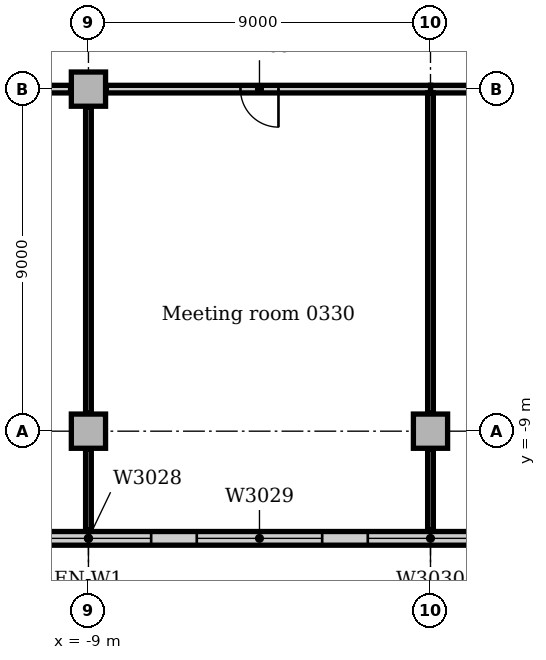
"""IFC4 building model, lengths in metres.
Left out: names, types, materials, properties, quantities, classifications, styles, units other than length and angle.
Written with IfcOpenShell. Run it as: python <this file> out.ifc"""

import sys

from ifc_helpers import new_model, si_unit, direction, frame, frame_2d, origin, origin_with_axes, origin_2d, place, context, subcontext, project, spatial, rectangle, extrude, element, fill, save


model = new_model("IFC4")
c1 = context("Model", 3, precision=1e-05, world=origin(), true_north=direction((0.0, 1.0)))
c2 = subcontext(c1, "Body", "Model", "MODEL_VIEW")
j1 = project(units=[si_unit("LENGTHUNIT", "METRE"), si_unit("PLANEANGLEUNIT", "RADIAN")], contexts=[c1])
p1 = place(None, origin())
s1 = spatial("IfcSite", under=j1, at=p1, CompositionType="ELEMENT")
p2 = place(p1, origin())
s2 = spatial("IfcBuilding", under=s1, at=p2, CompositionType="ELEMENT")
p3 = place(p2, frame((0.0, 0.0, 16.0)))
s3 = spatial("IfcBuildingStorey", under=s2, at=p3, CompositionType="ELEMENT", Elevation=16.0)
for number, where, z_axis, x_axis in (
    (1, (-9.0, -9.0, 0.0), (0.0, 0.0, 1.0), (1.0, 0.0, 0.0)),
    (2, (-9.0, 0.0, 0.0), (0.0, 0.0, 1.0), (1.0, 0.0, 0.0)),
    (3, (0.0, -9.0, 0.0), (0.0, 0.0, 1.0), (1.0, 0.0, 0.0)),
):
    element("IfcColumn", number, at=place(p3, frame(where, z_axis=z_axis, x_axis=x_axis)), inside=s3, PredefinedType="COLUMN", context=c2, shape_type="SweptSolid", body=[
        extrude(rectangle(XDim=0.9, YDim=0.9, at=origin_2d()), origin(), (0.0, 0.0, 1.0), 4.7),
    ])
p4 = place(p3, frame((-81.0, -11.82, 0.0), z_axis=(0.0, 0.0, 1.0), x_axis=(1.0, 0.0, 0.0)))
e4 = element("IfcWall", 4, at=p4, inside=s3, PredefinedType="STANDARD", context=c2, shape_type="SweptSolid", body=[
    extrude(rectangle(XDim=144.0, YDim=0.36, at=frame_2d((72.0, 0.0))), origin(), (0.0, 0.0, 1.0), 4.7),
])
p5 = place(p4, frame((2.85, 0.0, 0.9)))
e5 = element("IfcOpeningElement", 5, at=p5, cuts=e4, PredefinedType="OPENING", context=c2, shape_type="SweptSolid", body=[
    extrude(rectangle(XDim=3.3, YDim=2.4, at=frame_2d((1.65, 1.2))), frame((0.0, 0.19, 0.0), z_axis=(0.0, -1.0, 0.0), x_axis=(1.0, 0.0, 0.0)), (0.0, 0.0, 1.0), 0.38),
])
p6 = place(p4, frame((7.35, 0.0, 0.9)))
e6 = element("IfcOpeningElement", 6, at=p6, cuts=e4, PredefinedType="OPENING", context=c2, shape_type="SweptSolid", body=[
    extrude(rectangle(XDim=3.3, YDim=2.4, at=frame_2d((1.65, 1.2))), frame((0.0, 0.19, 0.0), z_axis=(0.0, -1.0, 0.0), x_axis=(1.0, 0.0, 0.0)), (0.0, 0.0, 1.0), 0.38),
])
p7 = place(p4, frame((11.85, 0.0, 0.9)))
e7 = element("IfcOpeningElement", 7, at=p7, cuts=e4, PredefinedType="OPENING", context=c2, shape_type="SweptSolid", body=[
    extrude(rectangle(XDim=3.3, YDim=2.4, at=frame_2d((1.65, 1.2))), frame((0.0, 0.19, 0.0), z_axis=(0.0, -1.0, 0.0), x_axis=(1.0, 0.0, 0.0)), (0.0, 0.0, 1.0), 0.38),
])
p8 = place(p4, frame((16.35, 0.0, 0.9)))
e8 = element("IfcOpeningElement", 8, at=p8, cuts=e4, PredefinedType="OPENING", context=c2, shape_type="SweptSolid", body=[
    extrude(rectangle(XDim=3.3, YDim=2.4, at=frame_2d((1.65, 1.2))), frame((0.0, 0.19, 0.0), z_axis=(0.0, -1.0, 0.0), x_axis=(1.0, 0.0, 0.0)), (0.0, 0.0, 1.0), 0.38),
])
p9 = place(p4, frame((20.85, 0.0, 0.9)))
e9 = element("IfcOpeningElement", 9, at=p9, cuts=e4, PredefinedType="OPENING", context=c2, shape_type="SweptSolid", body=[
    extrude(rectangle(XDim=3.3, YDim=2.4, at=frame_2d((1.65, 1.2))), frame((0.0, 0.19, 0.0), z_axis=(0.0, -1.0, 0.0), x_axis=(1.0, 0.0, 0.0)), (0.0, 0.0, 1.0), 0.38),
])
p10 = place(p4, frame((25.35, 0.0, 0.9)))
e10 = element("IfcOpeningElement", 10, at=p10, cuts=e4, PredefinedType="OPENING", context=c2, shape_type="SweptSolid", body=[
    extrude(rectangle(XDim=3.3, YDim=2.4, at=frame_2d((1.65, 1.2))), frame((0.0, 0.19, 0.0), z_axis=(0.0, -1.0, 0.0), x_axis=(1.0, 0.0, 0.0)), (0.0, 0.0, 1.0), 0.38),
])
p11 = place(p4, frame((29.85, 0.0, 0.9)))
e11 = element("IfcOpeningElement", 11, at=p11, cuts=e4, PredefinedType="OPENING", context=c2, shape_type="SweptSolid", body=[
    extrude(rectangle(XDim=3.3, YDim=2.4, at=frame_2d((1.65, 1.2))), frame((0.0, 0.19, 0.0), z_axis=(0.0, -1.0, 0.0), x_axis=(1.0, 0.0, 0.0)), (0.0, 0.0, 1.0), 0.38),
])
p12 = place(p4, frame((34.35, 0.0, 0.9)))
e12 = element("IfcOpeningElement", 12, at=p12, cuts=e4, PredefinedType="OPENING", context=c2, shape_type="SweptSolid", body=[
    extrude(rectangle(XDim=3.3, YDim=2.4, at=frame_2d((1.65, 1.2))), frame((0.0, 0.19, 0.0), z_axis=(0.0, -1.0, 0.0), x_axis=(1.0, 0.0, 0.0)), (0.0, 0.0, 1.0), 0.38),
])
p13 = place(p4, frame((38.85, 0.0, 0.9)))
e13 = element("IfcOpeningElement", 13, at=p13, cuts=e4, PredefinedType="OPENING", context=c2, shape_type="SweptSolid", body=[
    extrude(rectangle(XDim=3.3, YDim=2.4, at=frame_2d((1.65, 1.2))), frame((0.0, 0.19, 0.0), z_axis=(0.0, -1.0, 0.0), x_axis=(1.0, 0.0, 0.0)), (0.0, 0.0, 1.0), 0.38),
])
p14 = place(p4, frame((43.35, 0.0, 0.9)))
e14 = element("IfcOpeningElement", 14, at=p14, cuts=e4, PredefinedType="OPENING", context=c2, shape_type="SweptSolid", body=[
    extrude(rectangle(XDim=3.3, YDim=2.4, at=frame_2d((1.65, 1.2))), frame((0.0, 0.19, 0.0), z_axis=(0.0, -1.0, 0.0), x_axis=(1.0, 0.0, 0.0)), (0.0, 0.0, 1.0), 0.38),
])
p15 = place(p4, frame((47.85, 0.0, 0.9)))
e15 = element("IfcOpeningElement", 15, at=p15, cuts=e4, PredefinedType="OPENING", context=c2, shape_type="SweptSolid", body=[
    extrude(rectangle(XDim=3.3, YDim=2.4, at=frame_2d((1.65, 1.2))), frame((0.0, 0.19, 0.0), z_axis=(0.0, -1.0, 0.0), x_axis=(1.0, 0.0, 0.0)), (0.0, 0.0, 1.0), 0.38),
])
p16 = place(p4, frame((52.35, 0.0, 0.9)))
e16 = element("IfcOpeningElement", 16, at=p16, cuts=e4, PredefinedType="OPENING", context=c2, shape_type="SweptSolid", body=[
    extrude(rectangle(XDim=3.3, YDim=2.4, at=frame_2d((1.65, 1.2))), frame((0.0, 0.19, 0.0), z_axis=(0.0, -1.0, 0.0), x_axis=(1.0, 0.0, 0.0)), (0.0, 0.0, 1.0), 0.38),
])
p17 = place(p4, frame((56.85, 0.0, 0.9)))
e17 = element("IfcOpeningElement", 17, at=p17, cuts=e4, PredefinedType="OPENING", context=c2, shape_type="SweptSolid", body=[
    extrude(rectangle(XDim=3.3, YDim=2.4, at=frame_2d((1.65, 1.2))), frame((0.0, 0.19, 0.0), z_axis=(0.0, -1.0, 0.0), x_axis=(1.0, 0.0, 0.0)), (0.0, 0.0, 1.0), 0.38),
])
p18 = place(p4, frame((61.35, 0.0, 0.9)))
e18 = element("IfcOpeningElement", 18, at=p18, cuts=e4, PredefinedType="OPENING", context=c2, shape_type="SweptSolid", body=[
    extrude(rectangle(XDim=3.3, YDim=2.4, at=frame_2d((1.65, 1.2))), frame((0.0, 0.19, 0.0), z_axis=(0.0, -1.0, 0.0), x_axis=(1.0, 0.0, 0.0)), (0.0, 0.0, 1.0), 0.38),
])
p19 = place(p4, frame((65.85, 0.0, 0.9)))
e19 = element("IfcOpeningElement", 19, at=p19, cuts=e4, PredefinedType="OPENING", context=c2, shape_type="SweptSolid", body=[
    extrude(rectangle(XDim=3.3, YDim=2.4, at=frame_2d((1.65, 1.2))), frame((0.0, 0.19, 0.0), z_axis=(0.0, -1.0, 0.0), x_axis=(1.0, 0.0, 0.0)), (0.0, 0.0, 1.0), 0.38),
])
p20 = place(p4, frame((70.35, 0.0, 0.9)))
e20 = element("IfcOpeningElement", 20, at=p20, cuts=e4, PredefinedType="OPENING", context=c2, shape_type="SweptSolid", body=[
    extrude(rectangle(XDim=3.3, YDim=2.4, at=frame_2d((1.65, 1.2))), frame((0.0, 0.19, 0.0), z_axis=(0.0, -1.0, 0.0), x_axis=(1.0, 0.0, 0.0)), (0.0, 0.0, 1.0), 0.38),
])
p21 = place(p4, frame((74.85, 0.0, 0.9)))
e21 = element("IfcOpeningElement", 21, at=p21, cuts=e4, PredefinedType="OPENING", context=c2, shape_type="SweptSolid", body=[
    extrude(rectangle(XDim=3.3, YDim=2.4, at=frame_2d((1.65, 1.2))), frame((0.0, 0.19, 0.0), z_axis=(0.0, -1.0, 0.0), x_axis=(1.0, 0.0, 0.0)), (0.0, 0.0, 1.0), 0.38),
])
p22 = place(p4, frame((79.35, 0.0, 0.9)))
e22 = element("IfcOpeningElement", 22, at=p22, cuts=e4, PredefinedType="OPENING", context=c2, shape_type="SweptSolid", body=[
    extrude(rectangle(XDim=3.3, YDim=2.4, at=frame_2d((1.65, 1.2))), frame((0.0, 0.19, 0.0), z_axis=(0.0, -1.0, 0.0), x_axis=(1.0, 0.0, 0.0)), (0.0, 0.0, 1.0), 0.38),
])
p23 = place(p4, frame((83.85, 0.0, 0.9)))
e23 = element("IfcOpeningElement", 23, at=p23, cuts=e4, PredefinedType="OPENING", context=c2, shape_type="SweptSolid", body=[
    extrude(rectangle(XDim=3.3, YDim=2.4, at=frame_2d((1.65, 1.2))), frame((0.0, 0.19, 0.0), z_axis=(0.0, -1.0, 0.0), x_axis=(1.0, 0.0, 0.0)), (0.0, 0.0, 1.0), 0.38),
])
p24 = place(p4, frame((88.35, 0.0, 0.9)))
e24 = element("IfcOpeningElement", 24, at=p24, cuts=e4, PredefinedType="OPENING", context=c2, shape_type="SweptSolid", body=[
    extrude(rectangle(XDim=3.3, YDim=2.4, at=frame_2d((1.65, 1.2))), frame((0.0, 0.19, 0.0), z_axis=(0.0, -1.0, 0.0), x_axis=(1.0, 0.0, 0.0)), (0.0, 0.0, 1.0), 0.38),
])
p25 = place(p4, frame((92.85, 0.0, 0.9)))
e25 = element("IfcOpeningElement", 25, at=p25, cuts=e4, PredefinedType="OPENING", context=c2, shape_type="SweptSolid", body=[
    extrude(rectangle(XDim=3.3, YDim=2.4, at=frame_2d((1.65, 1.2))), frame((0.0, 0.19, 0.0), z_axis=(0.0, -1.0, 0.0), x_axis=(1.0, 0.0, 0.0)), (0.0, 0.0, 1.0), 0.38),
])
p26 = place(p4, frame((97.35, 0.0, 0.9)))
e26 = element("IfcOpeningElement", 26, at=p26, cuts=e4, PredefinedType="OPENING", context=c2, shape_type="SweptSolid", body=[
    extrude(rectangle(XDim=3.3, YDim=2.4, at=frame_2d((1.65, 1.2))), frame((0.0, 0.19, 0.0), z_axis=(0.0, -1.0, 0.0), x_axis=(1.0, 0.0, 0.0)), (0.0, 0.0, 1.0), 0.38),
])
p27 = place(p4, frame((101.85, 0.0, 0.9)))
e27 = element("IfcOpeningElement", 27, at=p27, cuts=e4, PredefinedType="OPENING", context=c2, shape_type="SweptSolid", body=[
    extrude(rectangle(XDim=3.3, YDim=2.4, at=frame_2d((1.65, 1.2))), frame((0.0, 0.19, 0.0), z_axis=(0.0, -1.0, 0.0), x_axis=(1.0, 0.0, 0.0)), (0.0, 0.0, 1.0), 0.38),
])
p28 = place(p4, frame((106.35, 0.0, 0.9)))
e28 = element("IfcOpeningElement", 28, at=p28, cuts=e4, PredefinedType="OPENING", context=c2, shape_type="SweptSolid", body=[
    extrude(rectangle(XDim=3.3, YDim=2.4, at=frame_2d((1.65, 1.2))), frame((0.0, 0.19, 0.0), z_axis=(0.0, -1.0, 0.0), x_axis=(1.0, 0.0, 0.0)), (0.0, 0.0, 1.0), 0.38),
])
p29 = place(p4, frame((110.85, 0.0, 0.9)))
e29 = element("IfcOpeningElement", 29, at=p29, cuts=e4, PredefinedType="OPENING", context=c2, shape_type="SweptSolid", body=[
    extrude(rectangle(XDim=3.3, YDim=2.4, at=frame_2d((1.65, 1.2))), frame((0.0, 0.19, 0.0), z_axis=(0.0, -1.0, 0.0), x_axis=(1.0, 0.0, 0.0)), (0.0, 0.0, 1.0), 0.38),
])
p30 = place(p4, frame((115.35, 0.0, 0.9)))
e30 = element("IfcOpeningElement", 30, at=p30, cuts=e4, PredefinedType="OPENING", context=c2, shape_type="SweptSolid", body=[
    extrude(rectangle(XDim=3.3, YDim=2.4, at=frame_2d((1.65, 1.2))), frame((0.0, 0.19, 0.0), z_axis=(0.0, -1.0, 0.0), x_axis=(1.0, 0.0, 0.0)), (0.0, 0.0, 1.0), 0.38),
])
p31 = place(p4, frame((119.85, 0.0, 0.9)))
e31 = element("IfcOpeningElement", 31, at=p31, cuts=e4, PredefinedType="OPENING", context=c2, shape_type="SweptSolid", body=[
    extrude(rectangle(XDim=3.3, YDim=2.4, at=frame_2d((1.65, 1.2))), frame((0.0, 0.19, 0.0), z_axis=(0.0, -1.0, 0.0), x_axis=(1.0, 0.0, 0.0)), (0.0, 0.0, 1.0), 0.38),
])
p32 = place(p4, frame((124.35, 0.0, 0.9)))
e32 = element("IfcOpeningElement", 32, at=p32, cuts=e4, PredefinedType="OPENING", context=c2, shape_type="SweptSolid", body=[
    extrude(rectangle(XDim=3.3, YDim=2.4, at=frame_2d((1.65, 1.2))), frame((0.0, 0.19, 0.0), z_axis=(0.0, -1.0, 0.0), x_axis=(1.0, 0.0, 0.0)), (0.0, 0.0, 1.0), 0.38),
])
p33 = place(p4, frame((128.85, 0.0, 0.9)))
e33 = element("IfcOpeningElement", 33, at=p33, cuts=e4, PredefinedType="OPENING", context=c2, shape_type="SweptSolid", body=[
    extrude(rectangle(XDim=3.3, YDim=2.4, at=frame_2d((1.65, 1.2))), frame((0.0, 0.19, 0.0), z_axis=(0.0, -1.0, 0.0), x_axis=(1.0, 0.0, 0.0)), (0.0, 0.0, 1.0), 0.38),
])
p34 = place(p4, frame((133.35, 0.0, 0.9)))
e34 = element("IfcOpeningElement", 34, at=p34, cuts=e4, PredefinedType="OPENING", context=c2, shape_type="SweptSolid", body=[
    extrude(rectangle(XDim=3.3, YDim=2.4, at=frame_2d((1.65, 1.2))), frame((0.0, 0.19, 0.0), z_axis=(0.0, -1.0, 0.0), x_axis=(1.0, 0.0, 0.0)), (0.0, 0.0, 1.0), 0.38),
])
p35 = place(p4, frame((137.85, 0.0, 0.9)))
e35 = element("IfcOpeningElement", 35, at=p35, cuts=e4, PredefinedType="OPENING", context=c2, shape_type="SweptSolid", body=[
    extrude(rectangle(XDim=3.3, YDim=2.4, at=frame_2d((1.65, 1.2))), frame((0.0, 0.19, 0.0), z_axis=(0.0, -1.0, 0.0), x_axis=(1.0, 0.0, 0.0)), (0.0, 0.0, 1.0), 0.38),
])
p36 = place(p3, origin_with_axes())
e36 = element("IfcWall", 36, at=p36, inside=s3, PredefinedType="PARTITIONING", context=c2, shape_type="SweptSolid", body=[
    extrude(rectangle(XDim=9.0, YDim=0.2, at=frame_2d((4.5, 0.0))), origin(), (0.0, 0.0, 1.0), 4.7),
])
p37 = place(p36, frame((4.3, 0.0, 0.0)))
e37 = element("IfcOpeningElement", 37, at=p37, cuts=e36, PredefinedType="OPENING", context=c2, shape_type="SweptSolid", body=[
    extrude(rectangle(XDim=1.0, YDim=2.1, at=frame_2d((0.5, 1.05))), frame((0.0, 0.11, 0.0), z_axis=(0.0, -1.0, 0.0), x_axis=(1.0, 0.0, 0.0)), (0.0, 0.0, 1.0), 0.22),
])
p38 = place(p3, frame((-17.53, 0.0, 0.0), z_axis=(0.0, 0.0, 1.0), x_axis=(1.0, 0.0, 0.0)))
e38 = element("IfcWall", 38, at=p38, inside=s3, PredefinedType="PARTITIONING", context=c2, shape_type="SweptSolid", body=[
    extrude(rectangle(XDim=8.06, YDim=0.2, at=frame_2d((4.03, 0.0))), origin(), (0.0, 0.0, 1.0), 4.7),
])
p39 = place(p38, frame((3.53, 0.0, 0.0)))
e39 = element("IfcOpeningElement", 39, at=p39, cuts=e38, PredefinedType="OPENING", context=c2, shape_type="SweptSolid", body=[
    extrude(rectangle(XDim=1.0, YDim=2.1, at=frame_2d((0.5, 1.05))), frame((0.0, 0.11, 0.0), z_axis=(0.0, -1.0, 0.0), x_axis=(1.0, 0.0, 0.0)), (0.0, 0.0, 1.0), 0.22),
])
p40 = place(p3, frame((-8.53, 0.0, 0.0), z_axis=(0.0, 0.0, 1.0), x_axis=(1.0, 0.0, 0.0)))
e40 = element("IfcWall", 40, at=p40, inside=s3, PredefinedType="PARTITIONING", context=c2, shape_type="SweptSolid", body=[
    extrude(rectangle(XDim=8.53, YDim=0.2, at=frame_2d((4.265, 0.0))), origin(), (0.0, 0.0, 1.0), 4.7),
])
p41 = place(p40, frame((3.53, 0.0, 0.0)))
e41 = element("IfcOpeningElement", 41, at=p41, cuts=e40, PredefinedType="OPENING", context=c2, shape_type="SweptSolid", body=[
    extrude(rectangle(XDim=1.0, YDim=2.1, at=frame_2d((0.5, 1.05))), frame((0.0, 0.11, 0.0), z_axis=(0.0, -1.0, 0.0), x_axis=(1.0, 0.0, 0.0)), (0.0, 0.0, 1.0), 0.22),
])
p42 = place(p3, frame((-9.0, -11.6, 0.0), z_axis=(0.0, 0.0, 1.0), x_axis=(0.0, 1.0, 0.0)))
e42 = element("IfcWall", 42, at=p42, inside=s3, PredefinedType="PARTITIONING", context=c2, shape_type="SweptSolid", body=[
    extrude(rectangle(XDim=2.13, YDim=0.15, at=frame_2d((1.065, 0.0))), origin(), (0.0, 0.0, 1.0), 4.7),
])
p43 = place(p3, frame((-9.0, -8.53, 0.0), z_axis=(0.0, 0.0, 1.0), x_axis=(0.0, 1.0, 0.0)))
e43 = element("IfcWall", 43, at=p43, inside=s3, PredefinedType="PARTITIONING", context=c2, shape_type="SweptSolid", body=[
    extrude(rectangle(XDim=8.06, YDim=0.15, at=frame_2d((4.03, 0.0))), origin(), (0.0, 0.0, 1.0), 4.7),
])
p44 = place(p3, frame((0.0, -11.6, 0.0), z_axis=(0.0, 0.0, 1.0), x_axis=(0.0, 1.0, 0.0)))
e44 = element("IfcWall", 44, at=p44, inside=s3, PredefinedType="PARTITIONING", context=c2, shape_type="SweptSolid", body=[
    extrude(rectangle(XDim=2.13, YDim=0.15, at=frame_2d((1.065, 0.0))), origin(), (0.0, 0.0, 1.0), 4.7),
])
p45 = place(p3, frame((0.0, -8.53, 0.0), z_axis=(0.0, 0.0, 1.0), x_axis=(0.0, 1.0, 0.0)))
e45 = element("IfcWall", 45, at=p45, inside=s3, PredefinedType="PARTITIONING", context=c2, shape_type="SweptSolid", body=[
    extrude(rectangle(XDim=8.43, YDim=0.15, at=frame_2d((4.215, 0.0))), origin(), (0.0, 0.0, 1.0), 4.7),
])
p46 = place(p20, origin())
e46 = element("IfcWindow", 46, at=p46, inside=s3, PartitioningType="SINGLE_PANEL", PredefinedType="WINDOW", context=c2, shape_type="SweptSolid", body=[
    extrude(rectangle(XDim=3.3, YDim=2.4, at=frame_2d((1.65, 1.2))), frame((0.0, 0.13, 0.0), z_axis=(0.0, -1.0, 0.0), x_axis=(1.0, 0.0, 0.0)), (0.0, 0.0, 1.0), 0.06),
])
fill(e20, e46)
p47 = place(p21, origin())
e47 = element("IfcWindow", 47, at=p47, inside=s3, PartitioningType="SINGLE_PANEL", PredefinedType="WINDOW", context=c2, shape_type="SweptSolid", body=[
    extrude(rectangle(XDim=3.3, YDim=2.4, at=frame_2d((1.65, 1.2))), frame((0.0, 0.13, 0.0), z_axis=(0.0, -1.0, 0.0), x_axis=(1.0, 0.0, 0.0)), (0.0, 0.0, 1.0), 0.06),
])
fill(e21, e47)
p48 = place(p22, origin())
e48 = element("IfcWindow", 48, at=p48, inside=s3, PartitioningType="SINGLE_PANEL", PredefinedType="WINDOW", context=c2, shape_type="SweptSolid", body=[
    extrude(rectangle(XDim=3.3, YDim=2.4, at=frame_2d((1.65, 1.2))), frame((0.0, 0.13, 0.0), z_axis=(0.0, -1.0, 0.0), x_axis=(1.0, 0.0, 0.0)), (0.0, 0.0, 1.0), 0.06),
])
fill(e22, e48)
p49 = place(p41, frame((1.0, 0.0, 0.0), z_axis=(0.0, 0.0, 1.0), x_axis=(-1.0, 0.0, 0.0)))
e49 = element("IfcDoor", 49, at=p49, inside=s3, OperationType="SINGLE_SWING_LEFT", PredefinedType="DOOR", context=c2, shape_type="SweptSolid", body=[
    extrude(rectangle(XDim=1.0, YDim=2.1, at=frame_2d((0.5, 1.05))), frame((0.0, 0.025, 0.0), z_axis=(0.0, -1.0, 0.0), x_axis=(1.0, 0.0, 0.0)), (0.0, 0.0, 1.0), 0.05),
])
fill(e41, e49)
save(model, sys.argv[1])
